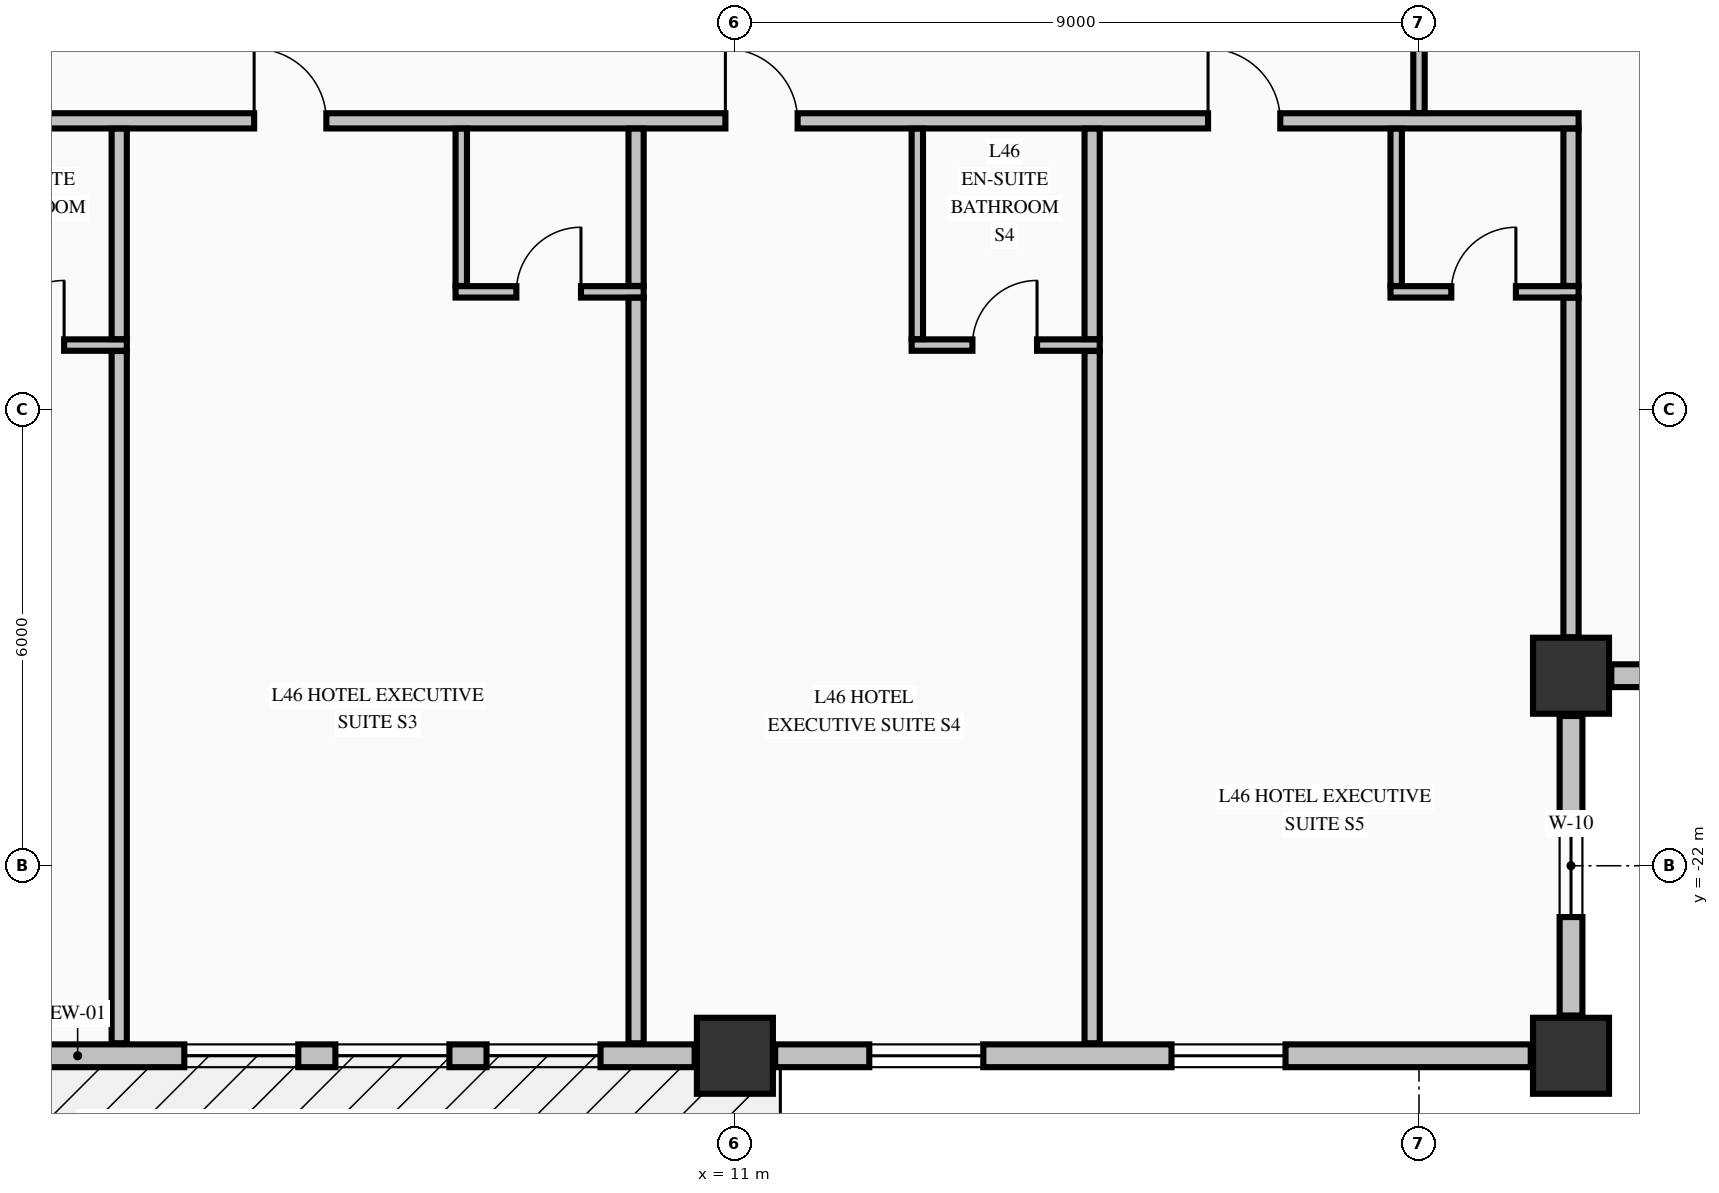
"""IFC4 building model, lengths in metres.
Left out: names, types, materials, properties, quantities, classifications, styles, units other than length and angle.
Written with IfcOpenShell. Run it as: python <this file> out.ifc"""

import sys

from ifc_helpers import new_model, si_unit, direction, frame, frame_2d, origin, origin_2d, place, context, subcontext, project, spatial, rectangle, extrude, element, fill, save


model = new_model("IFC4")
c1 = context("Model", 3, precision=1e-05, world=origin(), true_north=direction((0.0, 1.0)))
c2 = subcontext(c1, "Body", "Model", "MODEL_VIEW")
j1 = project(units=[si_unit("LENGTHUNIT", "METRE"), si_unit("PLANEANGLEUNIT", "RADIAN")], contexts=[c1])
p1 = place(None, origin())
s1 = spatial("IfcSite", under=j1, at=p1, CompositionType="ELEMENT")
p2 = place(p1, origin())
s2 = spatial("IfcBuilding", under=s1, at=p2, CompositionType="ELEMENT")
p3 = place(p2, frame((0.0, 0.0, 179.66)))
s3 = spatial("IfcBuildingStorey", under=s2, at=p3, CompositionType="ELEMENT", Elevation=179.66)
for number, where, z_axis, x_axis in (
    (1, (11.0, -24.5, -0.25), (0.0, 0.0, 1.0), (1.0, 0.0, 0.0)),
    (2, (22.0, -24.5, -0.25), (0.0, 0.0, 1.0), (1.0, 0.0, 0.0)),
    (3, (22.0, -19.5, -0.25), (0.0, 0.0, 1.0), (1.0, 0.0, 0.0)),
):
    element("IfcColumn", number, at=place(p3, frame(where, z_axis=z_axis, x_axis=x_axis)), inside=s3, PredefinedType="COLUMN", context=c2, shape_type="SweptSolid", body=[
        extrude(rectangle(XDim=1.0, YDim=1.0, at=origin_2d()), origin(), (0.0, 0.0, 1.0), 3.4),
    ])
p4 = place(p3, frame((22.0, -23.97, 0.0), z_axis=(0.0, 0.0, 1.0), x_axis=(0.0, 1.0, 0.0)))
e4 = element("IfcWall", 4, at=p4, inside=s3, PredefinedType="STANDARD", context=c2, shape_type="SweptSolid", body=[
    extrude(rectangle(XDim=3.94, YDim=0.3, at=frame_2d((1.97, 0.0))), origin(), (0.0, 0.0, 1.0), 2.542),
])
p5 = place(p4, frame((1.295, 0.0, 0.68)))
e5 = element("IfcOpeningElement", 5, at=p5, cuts=e4, PredefinedType="OPENING", context=c2, shape_type="SweptSolid", body=[
    extrude(rectangle(XDim=1.35, YDim=1.42, at=frame_2d((0.675, 0.71))), frame((0.0, 0.16, 0.0), z_axis=(0.0, -1.0, 0.0), x_axis=(1.0, 0.0, 0.0)), (0.0, 0.0, 1.0), 0.32),
])
p6 = place(p3, frame((22.53, -19.5, 0.0), z_axis=(0.0, 0.0, 1.0), x_axis=(1.0, 0.0, 0.0)))
e6 = element("IfcWall", 6, at=p6, inside=s3, PredefinedType="STANDARD", context=c2, shape_type="SweptSolid", body=[
    extrude(rectangle(XDim=3.94, YDim=0.3, at=frame_2d((1.97, 0.0))), origin(), (0.0, 0.0, 1.0), 2.542),
])
p7 = place(p6, frame((1.295, 0.0, 0.68)))
e7 = element("IfcOpeningElement", 7, at=p7, cuts=e6, PredefinedType="OPENING", context=c2, shape_type="SweptSolid", body=[
    extrude(rectangle(XDim=1.35, YDim=1.42, at=frame_2d((0.675, 0.71))), frame((0.0, 0.16, 0.0), z_axis=(0.0, -1.0, 0.0), x_axis=(1.0, 0.0, 0.0)), (0.0, 0.0, 1.0), 0.32),
])
p8 = place(p3, frame((0.53, -24.5, 0.0), z_axis=(0.0, 0.0, 1.0), x_axis=(1.0, 0.0, 0.0)))
e8 = element("IfcWall", 8, at=p8, inside=s3, PredefinedType="STANDARD", context=c2, shape_type="SweptSolid", body=[
    extrude(rectangle(XDim=9.94, YDim=0.3, at=frame_2d((4.97, 0.0))), origin(), (0.0, 0.0, 1.0), 2.542),
])
p9 = place(p8, frame((3.226, 0.0, 0.72)))
e9 = element("IfcOpeningElement", 9, at=p9, cuts=e8, PredefinedType="OPENING", context=c2, shape_type="SweptSolid", body=[
    extrude(rectangle(XDim=1.5, YDim=1.6, at=frame_2d((0.75, 0.8))), frame((0.0, 0.16, 0.0), z_axis=(0.0, -1.0, 0.0), x_axis=(1.0, 0.0, 0.0)), (0.0, 0.0, 1.0), 0.32),
])
p10 = place(p8, frame((5.214, 0.0, 0.72)))
e10 = element("IfcOpeningElement", 10, at=p10, cuts=e8, PredefinedType="OPENING", context=c2, shape_type="SweptSolid", body=[
    extrude(rectangle(XDim=1.5, YDim=1.6, at=frame_2d((0.75, 0.8))), frame((0.0, 0.16, 0.0), z_axis=(0.0, -1.0, 0.0), x_axis=(1.0, 0.0, 0.0)), (0.0, 0.0, 1.0), 0.32),
])
p11 = place(p8, frame((7.202, 0.0, 0.72)))
e11 = element("IfcOpeningElement", 11, at=p11, cuts=e8, PredefinedType="OPENING", context=c2, shape_type="SweptSolid", body=[
    extrude(rectangle(XDim=1.5, YDim=1.6, at=frame_2d((0.75, 0.8))), frame((0.0, 0.16, 0.0), z_axis=(0.0, -1.0, 0.0), x_axis=(1.0, 0.0, 0.0)), (0.0, 0.0, 1.0), 0.32),
])
p12 = place(p3, frame((11.53, -24.5, 0.0), z_axis=(0.0, 0.0, 1.0), x_axis=(1.0, 0.0, 0.0)))
e12 = element("IfcWall", 12, at=p12, inside=s3, PredefinedType="STANDARD", context=c2, shape_type="SweptSolid", body=[
    extrude(rectangle(XDim=9.94, YDim=0.3, at=frame_2d((4.97, 0.0))), origin(), (0.0, 0.0, 1.0), 2.542),
])
p13 = place(p12, frame((1.238, 0.0, 0.72)))
e13 = element("IfcOpeningElement", 13, at=p13, cuts=e12, PredefinedType="OPENING", context=c2, shape_type="SweptSolid", body=[
    extrude(rectangle(XDim=1.5, YDim=1.6, at=frame_2d((0.75, 0.8))), frame((0.0, 0.16, 0.0), z_axis=(0.0, -1.0, 0.0), x_axis=(1.0, 0.0, 0.0)), (0.0, 0.0, 1.0), 0.32),
])
p14 = place(p12, frame((5.214, 0.0, 0.72)))
e14 = element("IfcOpeningElement", 14, at=p14, cuts=e12, PredefinedType="OPENING", context=c2, shape_type="SweptSolid", body=[
    extrude(rectangle(XDim=1.5, YDim=1.6, at=frame_2d((0.75, 0.8))), frame((0.0, 0.16, 0.0), z_axis=(0.0, -1.0, 0.0), x_axis=(1.0, 0.0, 0.0)), (0.0, 0.0, 1.0), 0.32),
])
p15 = place(p3, frame((0.525, -15.15, 0.0), z_axis=(0.0, 0.0, 1.0), x_axis=(1.0, 0.0, 0.0)))
e15 = element("IfcWall", 15, at=p15, inside=s3, PredefinedType="PARTITIONING", context=c2, shape_type="SweptSolid", body=[
    extrude(rectangle(XDim=2.475, YDim=0.15, at=frame_2d((1.238, 0.0))), origin(), (0.0, 0.0, 1.0), 3.15),
])
p16 = place(p15, frame((0.8, 0.0, 0.0)))
e16 = element("IfcOpeningElement", 16, at=p16, cuts=e15, PredefinedType="OPENING", context=c2, shape_type="SweptSolid", body=[
    extrude(rectangle(XDim=0.85, YDim=2.1, at=frame_2d((0.425, 1.05))), frame((0.0, 0.085, 0.0), z_axis=(0.0, -1.0, 0.0), x_axis=(1.0, 0.0, 0.0)), (0.0, 0.0, 1.0), 0.17),
])
p17 = place(p3, frame((13.325, -15.15, 0.0), z_axis=(0.0, 0.0, 1.0), x_axis=(1.0, 0.0, 0.0)))
e17 = element("IfcWall", 17, at=p17, inside=s3, PredefinedType="PARTITIONING", context=c2, shape_type="SweptSolid", body=[
    extrude(rectangle(XDim=2.475, YDim=0.15, at=frame_2d((1.238, 0.0))), origin(), (0.0, 0.0, 1.0), 3.15),
])
p18 = place(p17, frame((0.8, 0.0, 0.0)))
e18 = element("IfcOpeningElement", 18, at=p18, cuts=e17, PredefinedType="OPENING", context=c2, shape_type="SweptSolid", body=[
    extrude(rectangle(XDim=0.85, YDim=2.1, at=frame_2d((0.425, 1.05))), frame((0.0, 0.085, 0.0), z_axis=(0.0, -1.0, 0.0), x_axis=(1.0, 0.0, 0.0)), (0.0, 0.0, 1.0), 0.17),
])
p19 = place(p3, frame((7.325, -14.45, 0.0), z_axis=(0.0, 0.0, 1.0), x_axis=(1.0, 0.0, 0.0)))
e19 = element("IfcWall", 19, at=p19, inside=s3, PredefinedType="PARTITIONING", context=c2, shape_type="SweptSolid", body=[
    extrude(rectangle(XDim=2.475, YDim=0.15, at=frame_2d((1.238, 0.0))), origin(), (0.0, 0.0, 1.0), 3.15),
])
p20 = place(p19, frame((0.8, 0.0, 0.0)))
e20 = element("IfcOpeningElement", 20, at=p20, cuts=e19, PredefinedType="OPENING", context=c2, shape_type="SweptSolid", body=[
    extrude(rectangle(XDim=0.85, YDim=2.1, at=frame_2d((0.425, 1.05))), frame((0.0, 0.085, 0.0), z_axis=(0.0, -1.0, 0.0), x_axis=(1.0, 0.0, 0.0)), (0.0, 0.0, 1.0), 0.17),
])
p21 = place(p3, frame((19.625, -14.45, 0.0), z_axis=(0.0, 0.0, 1.0), x_axis=(1.0, 0.0, 0.0)))
e21 = element("IfcWall", 21, at=p21, inside=s3, PredefinedType="PARTITIONING", context=c2, shape_type="SweptSolid", body=[
    extrude(rectangle(XDim=2.475, YDim=0.15, at=frame_2d((1.238, 0.0))), origin(), (0.0, 0.0, 1.0), 3.15),
])
p22 = place(p21, frame((0.8, 0.0, 0.0)))
e22 = element("IfcOpeningElement", 22, at=p22, cuts=e21, PredefinedType="OPENING", context=c2, shape_type="SweptSolid", body=[
    extrude(rectangle(XDim=0.85, YDim=2.1, at=frame_2d((0.425, 1.05))), frame((0.0, 0.085, 0.0), z_axis=(0.0, -1.0, 0.0), x_axis=(1.0, 0.0, 0.0)), (0.0, 0.0, 1.0), 0.17),
])
p23 = place(p3, frame((-17.1, -12.2, 0.0), z_axis=(0.0, 0.0, 1.0), x_axis=(1.0, 0.0, 0.0)))
e23 = element("IfcWall", 23, at=p23, inside=s3, PredefinedType="PARTITIONING", context=c2, shape_type="SweptSolid", body=[
    extrude(rectangle(XDim=39.2, YDim=0.2, at=frame_2d((19.6, 0.0))), origin(), (0.0, 0.0, 1.0), 3.15),
])
p24 = place(p23, frame((3.825, 0.0, 0.0)))
e24 = element("IfcOpeningElement", 24, at=p24, cuts=e23, PredefinedType="OPENING", context=c2, shape_type="SweptSolid", body=[
    extrude(rectangle(XDim=0.95, YDim=2.15, at=frame_2d((0.475, 1.075))), frame((0.0, 0.11, 0.0), z_axis=(0.0, -1.0, 0.0), x_axis=(1.0, 0.0, 0.0)), (0.0, 0.0, 1.0), 0.22),
])
p25 = place(p23, frame((13.775, 0.0, 0.0)))
e25 = element("IfcOpeningElement", 25, at=p25, cuts=e23, PredefinedType="OPENING", context=c2, shape_type="SweptSolid", body=[
    extrude(rectangle(XDim=0.95, YDim=2.15, at=frame_2d((0.475, 1.075))), frame((0.0, 0.11, 0.0), z_axis=(0.0, -1.0, 0.0), x_axis=(1.0, 0.0, 0.0)), (0.0, 0.0, 1.0), 0.22),
])
p26 = place(p23, frame((21.775, 0.0, 0.0)))
e26 = element("IfcOpeningElement", 26, at=p26, cuts=e23, PredefinedType="OPENING", context=c2, shape_type="SweptSolid", body=[
    extrude(rectangle(XDim=0.95, YDim=2.15, at=frame_2d((0.475, 1.075))), frame((0.0, 0.11, 0.0), z_axis=(0.0, -1.0, 0.0), x_axis=(1.0, 0.0, 0.0)), (0.0, 0.0, 1.0), 0.22),
])
p27 = place(p23, frame((27.975, 0.0, 0.0)))
e27 = element("IfcOpeningElement", 27, at=p27, cuts=e23, PredefinedType="OPENING", context=c2, shape_type="SweptSolid", body=[
    extrude(rectangle(XDim=0.95, YDim=2.15, at=frame_2d((0.475, 1.075))), frame((0.0, 0.11, 0.0), z_axis=(0.0, -1.0, 0.0), x_axis=(1.0, 0.0, 0.0)), (0.0, 0.0, 1.0), 0.22),
])
p28 = place(p23, frame((34.325, 0.0, 0.0)))
e28 = element("IfcOpeningElement", 28, at=p28, cuts=e23, PredefinedType="OPENING", context=c2, shape_type="SweptSolid", body=[
    extrude(rectangle(XDim=0.95, YDim=2.15, at=frame_2d((0.475, 1.075))), frame((0.0, 0.11, 0.0), z_axis=(0.0, -1.0, 0.0), x_axis=(1.0, 0.0, 0.0)), (0.0, 0.0, 1.0), 0.22),
])
p29 = place(p3, frame((2.9, -24.335, 0.0), z_axis=(0.0, 0.0, 1.0), x_axis=(0.0, 1.0, 0.0)))
e29 = element("IfcWall", 29, at=p29, inside=s3, PredefinedType="PARTITIONING", context=c2, shape_type="SweptSolid", body=[
    extrude(rectangle(XDim=9.107, YDim=0.2, at=frame_2d((4.553, 0.0))), origin(), (0.0, 0.0, 1.0), 3.15),
])
p30 = place(p3, frame((2.9, -15.072, 0.0), z_axis=(0.0, 0.0, 1.0), x_axis=(0.0, 1.0, 0.0)))
e30 = element("IfcWall", 30, at=p30, inside=s3, PredefinedType="PARTITIONING", context=c2, shape_type="SweptSolid", body=[
    extrude(rectangle(XDim=2.769, YDim=0.2, at=frame_2d((1.385, 0.0))), origin(), (0.0, 0.0, 1.0), 3.15),
])
p31 = place(p3, frame((7.4, -14.372, 0.0), z_axis=(0.0, 0.0, 1.0), x_axis=(0.0, 1.0, 0.0)))
e31 = element("IfcWall", 31, at=p31, inside=s3, PredefinedType="PARTITIONING", context=c2, shape_type="SweptSolid", body=[
    extrude(rectangle(XDim=2.069, YDim=0.15, at=frame_2d((1.035, 0.0))), origin(), (0.0, 0.0, 1.0), 3.15),
])
p32 = place(p3, frame((9.7, -24.335, 0.0), z_axis=(0.0, 0.0, 1.0), x_axis=(0.0, 1.0, 0.0)))
e32 = element("IfcWall", 32, at=p32, inside=s3, PredefinedType="PARTITIONING", context=c2, shape_type="SweptSolid", body=[
    extrude(rectangle(XDim=9.807, YDim=0.2, at=frame_2d((4.903, 0.0))), origin(), (0.0, 0.0, 1.0), 3.15),
])
p33 = place(p3, frame((9.7, -14.372, 0.0), z_axis=(0.0, 0.0, 1.0), x_axis=(0.0, 1.0, 0.0)))
e33 = element("IfcWall", 33, at=p33, inside=s3, PredefinedType="PARTITIONING", context=c2, shape_type="SweptSolid", body=[
    extrude(rectangle(XDim=2.069, YDim=0.2, at=frame_2d((1.035, 0.0))), origin(), (0.0, 0.0, 1.0), 3.15),
])
p34 = place(p3, frame((13.4, -15.072, 0.0), z_axis=(0.0, 0.0, 1.0), x_axis=(0.0, 1.0, 0.0)))
e34 = element("IfcWall", 34, at=p34, inside=s3, PredefinedType="PARTITIONING", context=c2, shape_type="SweptSolid", body=[
    extrude(rectangle(XDim=2.769, YDim=0.15, at=frame_2d((1.385, 0.0))), origin(), (0.0, 0.0, 1.0), 3.15),
])
p35 = place(p3, frame((15.7, -24.335, 0.0), z_axis=(0.0, 0.0, 1.0), x_axis=(0.0, 1.0, 0.0)))
e35 = element("IfcWall", 35, at=p35, inside=s3, PredefinedType="PARTITIONING", context=c2, shape_type="SweptSolid", body=[
    extrude(rectangle(XDim=9.107, YDim=0.2, at=frame_2d((4.553, 0.0))), origin(), (0.0, 0.0, 1.0), 3.15),
])
p36 = place(p3, frame((15.7, -15.072, 0.0), z_axis=(0.0, 0.0, 1.0), x_axis=(0.0, 1.0, 0.0)))
e36 = element("IfcWall", 36, at=p36, inside=s3, PredefinedType="PARTITIONING", context=c2, shape_type="SweptSolid", body=[
    extrude(rectangle(XDim=2.769, YDim=0.2, at=frame_2d((1.385, 0.0))), origin(), (0.0, 0.0, 1.0), 3.15),
])
p37 = place(p3, frame((19.7, -14.372, 0.0), z_axis=(0.0, 0.0, 1.0), x_axis=(0.0, 1.0, 0.0)))
e37 = element("IfcWall", 37, at=p37, inside=s3, PredefinedType="PARTITIONING", context=c2, shape_type="SweptSolid", body=[
    extrude(rectangle(XDim=2.069, YDim=0.15, at=frame_2d((1.035, 0.0))), origin(), (0.0, 0.0, 1.0), 2.342),
])
p38 = place(p3, frame((20.0, -12.097, 0.0), z_axis=(0.0, 0.0, 1.0), x_axis=(0.0, 1.0, 0.0)))
e38 = element("IfcWall", 38, at=p38, inside=s3, PredefinedType="PARTITIONING", context=c2, shape_type="SweptSolid", body=[
    extrude(rectangle(XDim=1.716, YDim=0.15, at=frame_2d((0.858, 0.0))), origin(), (0.0, 0.0, 1.0), 2.342),
])
p39 = place(p3, frame((22.0, -18.994, 0.0), z_axis=(0.0, 0.0, 1.0), x_axis=(0.0, 1.0, 0.0)))
e39 = element("IfcWall", 39, at=p39, inside=s3, PredefinedType="PARTITIONING", context=c2, shape_type="SweptSolid", body=[
    extrude(rectangle(XDim=4.466, YDim=0.2, at=frame_2d((2.233, 0.0))), origin(), (0.0, 0.0, 1.0), 3.15),
])
p40 = place(p3, frame((22.0, -14.372, 0.0), z_axis=(0.0, 0.0, 1.0), x_axis=(0.0, 1.0, 0.0)))
e40 = element("IfcWall", 40, at=p40, inside=s3, PredefinedType="PARTITIONING", context=c2, shape_type="SweptSolid", body=[
    extrude(rectangle(XDim=2.069, YDim=0.2, at=frame_2d((1.035, 0.0))), origin(), (0.0, 0.0, 1.0), 3.15),
])
p41 = place(p5, origin())
e41 = element("IfcWindow", 41, at=p41, inside=s3, PartitioningType="SINGLE_PANEL", PredefinedType="WINDOW", context=c2, shape_type="SweptSolid", body=[
    extrude(rectangle(XDim=1.35, YDim=1.42, at=frame_2d((0.675, 0.71))), frame((0.0, 0.03, 0.0), z_axis=(0.0, -1.0, 0.0), x_axis=(1.0, 0.0, 0.0)), (0.0, 0.0, 1.0), 0.06),
])
fill(e5, e41)
p42 = place(p9, origin())
e42 = element("IfcWindow", 42, at=p42, inside=s3, PartitioningType="SINGLE_PANEL", PredefinedType="WINDOW", context=c2, shape_type="SweptSolid", body=[
    extrude(rectangle(XDim=1.5, YDim=1.6, at=frame_2d((0.75, 0.8))), frame((0.0, 0.03, 0.0), z_axis=(0.0, -1.0, 0.0), x_axis=(1.0, 0.0, 0.0)), (0.0, 0.0, 1.0), 0.06),
])
fill(e9, e42)
p43 = place(p10, origin())
e43 = element("IfcWindow", 43, at=p43, inside=s3, PartitioningType="SINGLE_PANEL", PredefinedType="WINDOW", context=c2, shape_type="SweptSolid", body=[
    extrude(rectangle(XDim=1.5, YDim=1.6, at=frame_2d((0.75, 0.8))), frame((0.0, 0.03, 0.0), z_axis=(0.0, -1.0, 0.0), x_axis=(1.0, 0.0, 0.0)), (0.0, 0.0, 1.0), 0.06),
])
fill(e10, e43)
p44 = place(p11, origin())
e44 = element("IfcWindow", 44, at=p44, inside=s3, PartitioningType="SINGLE_PANEL", PredefinedType="WINDOW", context=c2, shape_type="SweptSolid", body=[
    extrude(rectangle(XDim=1.5, YDim=1.6, at=frame_2d((0.75, 0.8))), frame((0.0, 0.03, 0.0), z_axis=(0.0, -1.0, 0.0), x_axis=(1.0, 0.0, 0.0)), (0.0, 0.0, 1.0), 0.06),
])
fill(e11, e44)
p45 = place(p13, origin())
e45 = element("IfcWindow", 45, at=p45, inside=s3, PartitioningType="SINGLE_PANEL", PredefinedType="WINDOW", context=c2, shape_type="SweptSolid", body=[
    extrude(rectangle(XDim=1.5, YDim=1.6, at=frame_2d((0.75, 0.8))), frame((0.0, 0.03, 0.0), z_axis=(0.0, -1.0, 0.0), x_axis=(1.0, 0.0, 0.0)), (0.0, 0.0, 1.0), 0.06),
])
fill(e13, e45)
p46 = place(p14, origin())
e46 = element("IfcWindow", 46, at=p46, inside=s3, PartitioningType="SINGLE_PANEL", PredefinedType="WINDOW", context=c2, shape_type="SweptSolid", body=[
    extrude(rectangle(XDim=1.5, YDim=1.6, at=frame_2d((0.75, 0.8))), frame((0.0, 0.03, 0.0), z_axis=(0.0, -1.0, 0.0), x_axis=(1.0, 0.0, 0.0)), (0.0, 0.0, 1.0), 0.06),
])
fill(e14, e46)
p47 = place(p16, origin())
e47 = element("IfcDoor", 47, at=p47, inside=s3, OperationType="SINGLE_SWING_RIGHT", PredefinedType="DOOR", context=c2, shape_type="SweptSolid", body=[
    extrude(rectangle(XDim=0.85, YDim=2.1, at=frame_2d((0.425, 1.05))), frame((0.0, 0.025, 0.0), z_axis=(0.0, -1.0, 0.0), x_axis=(1.0, 0.0, 0.0)), (0.0, 0.0, 1.0), 0.05),
])
fill(e16, e47)
p48 = place(p26, origin())
e48 = element("IfcDoor", 48, at=p48, inside=s3, OperationType="SINGLE_SWING_LEFT", PredefinedType="DOOR", context=c2, shape_type="SweptSolid", body=[
    extrude(rectangle(XDim=0.95, YDim=2.15, at=frame_2d((0.475, 1.075))), frame((0.0, 0.025, 0.0), z_axis=(0.0, -1.0, 0.0), x_axis=(1.0, 0.0, 0.0)), (0.0, 0.0, 1.0), 0.05),
])
fill(e26, e48)
p49 = place(p20, origin())
e49 = element("IfcDoor", 49, at=p49, inside=s3, OperationType="SINGLE_SWING_RIGHT", PredefinedType="DOOR", context=c2, shape_type="SweptSolid", body=[
    extrude(rectangle(XDim=0.85, YDim=2.1, at=frame_2d((0.425, 1.05))), frame((0.0, 0.025, 0.0), z_axis=(0.0, -1.0, 0.0), x_axis=(1.0, 0.0, 0.0)), (0.0, 0.0, 1.0), 0.05),
])
fill(e20, e49)
p50 = place(p27, origin())
e50 = element("IfcDoor", 50, at=p50, inside=s3, OperationType="SINGLE_SWING_LEFT", PredefinedType="DOOR", context=c2, shape_type="SweptSolid", body=[
    extrude(rectangle(XDim=0.95, YDim=2.15, at=frame_2d((0.475, 1.075))), frame((0.0, 0.025, 0.0), z_axis=(0.0, -1.0, 0.0), x_axis=(1.0, 0.0, 0.0)), (0.0, 0.0, 1.0), 0.05),
])
fill(e27, e50)
p51 = place(p18, origin())
e51 = element("IfcDoor", 51, at=p51, inside=s3, OperationType="SINGLE_SWING_RIGHT", PredefinedType="DOOR", context=c2, shape_type="SweptSolid", body=[
    extrude(rectangle(XDim=0.85, YDim=2.1, at=frame_2d((0.425, 1.05))), frame((0.0, 0.025, 0.0), z_axis=(0.0, -1.0, 0.0), x_axis=(1.0, 0.0, 0.0)), (0.0, 0.0, 1.0), 0.05),
])
fill(e18, e51)
p52 = place(p28, origin())
e52 = element("IfcDoor", 52, at=p52, inside=s3, OperationType="SINGLE_SWING_LEFT", PredefinedType="DOOR", context=c2, shape_type="SweptSolid", body=[
    extrude(rectangle(XDim=0.95, YDim=2.15, at=frame_2d((0.475, 1.075))), frame((0.0, 0.025, 0.0), z_axis=(0.0, -1.0, 0.0), x_axis=(1.0, 0.0, 0.0)), (0.0, 0.0, 1.0), 0.05),
])
fill(e28, e52)
p53 = place(p22, origin())
e53 = element("IfcDoor", 53, at=p53, inside=s3, OperationType="SINGLE_SWING_RIGHT", PredefinedType="DOOR", context=c2, shape_type="SweptSolid", body=[
    extrude(rectangle(XDim=0.85, YDim=2.1, at=frame_2d((0.425, 1.05))), frame((0.0, 0.025, 0.0), z_axis=(0.0, -1.0, 0.0), x_axis=(1.0, 0.0, 0.0)), (0.0, 0.0, 1.0), 0.05),
])
fill(e22, e53)
save(model, sys.argv[1])
